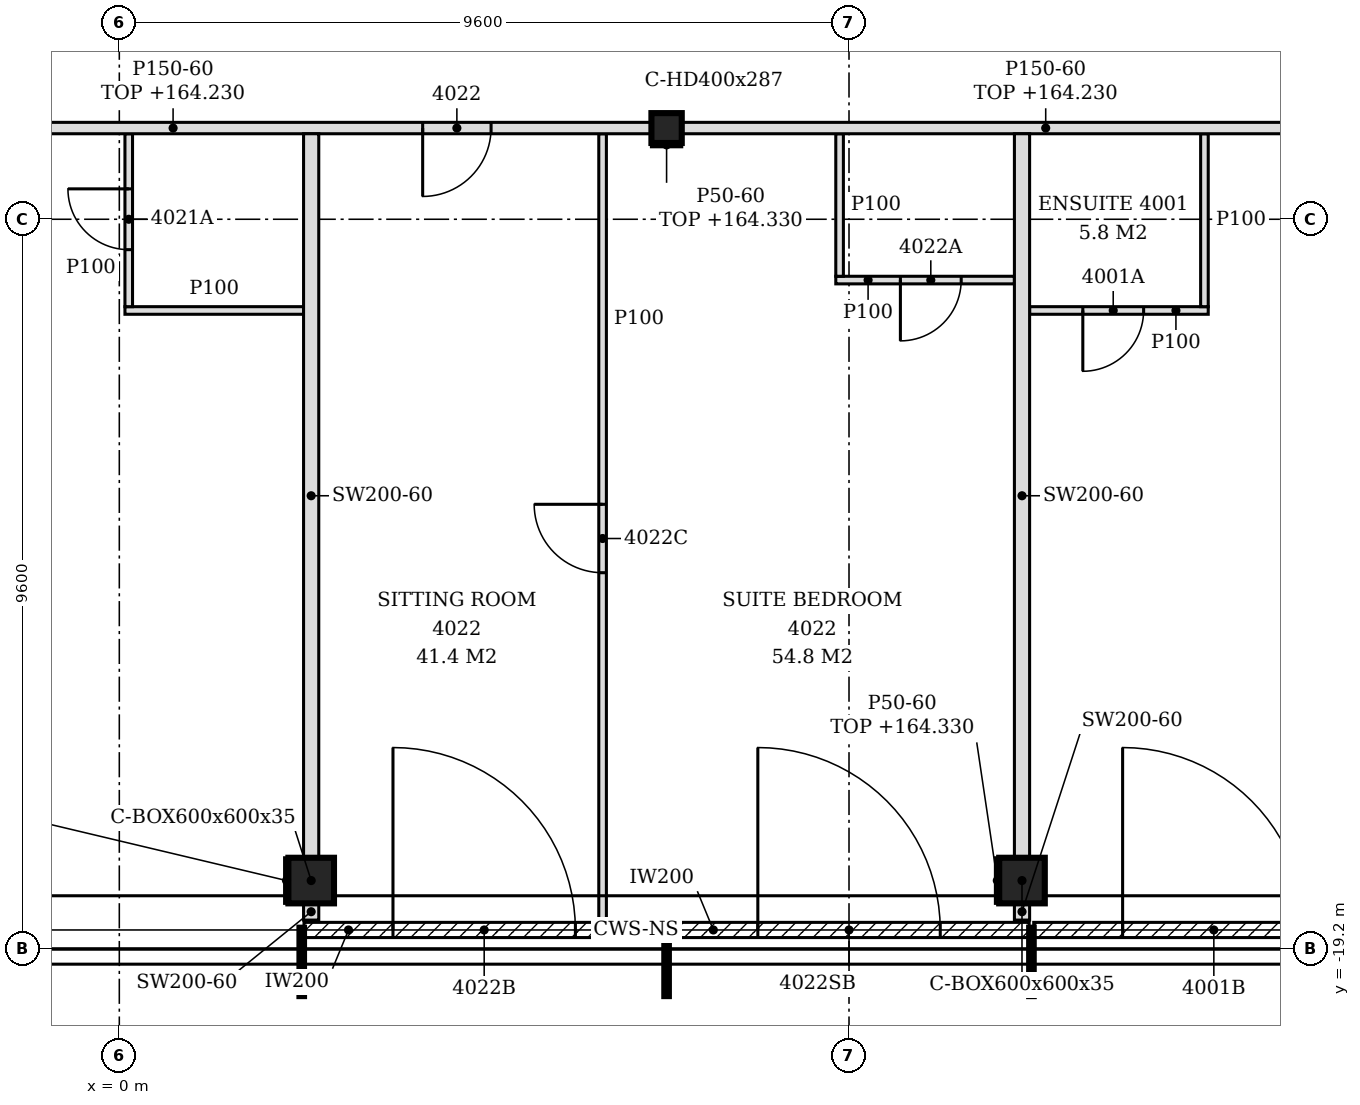
"""IFC4 building model, lengths in metres.
Left out: names, types, materials, properties, quantities, classifications, styles, units other than length and angle.
Written with IfcOpenShell. Run it as: python <this file> out.ifc"""

import sys

from ifc_helpers import new_model, si_unit, direction, frame, frame_2d, origin, origin_2d, place, context, subcontext, project, spatial, polyline, rectangle, hollow_rectangle, i_section, outline, extrude, element, fill, save


model = new_model("IFC4")
c1 = context("Model", 3, precision=1e-05, world=origin(), true_north=direction((0.0, 1.0)))
c2 = subcontext(c1, "Body", "Model", "MODEL_VIEW")
j1 = project(units=[si_unit("LENGTHUNIT", "METRE"), si_unit("PLANEANGLEUNIT", "RADIAN")], contexts=[c1])
p1 = place(None, origin())
s1 = spatial("IfcSite", under=j1, at=p1, CompositionType="ELEMENT")
p2 = place(p1, origin())
s2 = spatial("IfcBuilding", under=s1, at=p2, CompositionType="ELEMENT")
p3 = place(p2, frame((0.0, 0.0, 161.4)))
s3 = spatial("IfcBuildingStorey", under=s2, at=p3, CompositionType="ELEMENT", Elevation=161.4)
for number, where, z_axis, x_axis in (
    (1, (2.524, -18.3, -0.15), (0.0, 0.0, 1.0), (1.0, 0.0, 0.0)),
    (2, (11.876, -18.3, -0.15), (0.0, 0.0, 1.0), (1.0, 0.0, 0.0)),
):
    element("IfcColumn", number, at=place(p3, frame(where, z_axis=z_axis, x_axis=x_axis)), inside=s3, PredefinedType="COLUMN", context=c2, shape_type="SweptSolid", body=[
        extrude(hollow_rectangle(XDim=0.6, YDim=0.6, WallThickness=0.035, at=origin_2d()), origin(), (0.0, 0.0, 1.0), 3.6),
    ])
p4 = place(p3, frame((7.2, -8.4, -0.15), z_axis=(0.0, 0.0, 1.0), x_axis=(1.0, 0.0, 0.0)))
e3 = element("IfcColumn", 3, at=p4, inside=s3, PredefinedType="COLUMN", context=c2, shape_type="SweptSolid", body=[
    extrude(i_section(OverallWidth=0.399, OverallDepth=0.393, WebThickness=0.023, FlangeThickness=0.037, FilletRadius=0.015, at=origin_2d()), origin(), (0.0, 0.0, 1.0), 3.6),
])
p5 = place(p3, frame((2.43, -18.95, 0.0), z_axis=(0.0, 0.0, 1.0), x_axis=(1.0, 0.0, 0.0)))
e4 = element("IfcWall", 4, at=p5, inside=s3, PredefinedType="NOTDEFINED", context=c2, shape_type="SweptSolid", body=[
    extrude(rectangle(XDim=4.74, YDim=0.2, at=frame_2d((2.37, 0.0))), origin(), (0.0, 0.0, 1.0), 3.45),
])
p6 = place(p5, frame((1.17, 0.0, 0.0)))
e5 = element("IfcOpeningElement", 5, at=p6, cuts=e4, PredefinedType="OPENING", context=c2, shape_type="SweptSolid", body=[
    extrude(rectangle(XDim=2.4, YDim=2.4, at=frame_2d((1.2, 1.2))), frame((0.0, 0.11, 0.0), z_axis=(0.0, -1.0, 0.0), x_axis=(1.0, 0.0, 0.0)), (0.0, 0.0, 1.0), 0.22),
])
p7 = place(p3, frame((7.23, -18.95, 0.0), z_axis=(0.0, 0.0, 1.0), x_axis=(1.0, 0.0, 0.0)))
e6 = element("IfcWall", 6, at=p7, inside=s3, PredefinedType="NOTDEFINED", context=c2, shape_type="SweptSolid", body=[
    extrude(rectangle(XDim=4.74, YDim=0.2, at=frame_2d((2.37, 0.0))), origin(), (0.0, 0.0, 1.0), 3.45),
])
p8 = place(p7, frame((1.17, 0.0, 0.0)))
e7 = element("IfcOpeningElement", 7, at=p8, cuts=e6, PredefinedType="OPENING", context=c2, shape_type="SweptSolid", body=[
    extrude(rectangle(XDim=2.4, YDim=2.4, at=frame_2d((1.2, 1.2))), frame((0.0, 0.11, 0.0), z_axis=(0.0, -1.0, 0.0), x_axis=(1.0, 0.0, 0.0)), (0.0, 0.0, 1.0), 0.22),
])
p9 = place(p3, frame((12.03, -18.95, 0.0), z_axis=(0.0, 0.0, 1.0), x_axis=(1.0, 0.0, 0.0)))
e8 = element("IfcWall", 8, at=p9, inside=s3, PredefinedType="NOTDEFINED", context=c2, shape_type="SweptSolid", body=[
    extrude(rectangle(XDim=4.74, YDim=0.2, at=frame_2d((2.37, 0.0))), origin(), (0.0, 0.0, 1.0), 3.45),
])
p10 = place(p9, frame((1.17, 0.0, 0.0)))
e9 = element("IfcOpeningElement", 9, at=p10, cuts=e8, PredefinedType="OPENING", context=c2, shape_type="SweptSolid", body=[
    extrude(rectangle(XDim=2.4, YDim=2.4, at=frame_2d((1.2, 1.2))), frame((0.0, 0.11, 0.0), z_axis=(0.0, -1.0, 0.0), x_axis=(1.0, 0.0, 0.0)), (0.0, 0.0, 1.0), 0.22),
])
p11 = place(p3, frame((2.524, -18.82, 0.0), z_axis=(0.0, 0.0, 1.0), x_axis=(0.0, 1.0, 0.0)))
e10 = element("IfcWall", 10, at=p11, inside=s3, PredefinedType="PARTITIONING", context=c2, shape_type="SweptSolid", body=[
    extrude(rectangle(XDim=0.22, YDim=0.2, at=frame_2d((0.11, 0.0))), origin(), (0.0, 0.0, 1.0), 3.45),
])
p12 = place(p3, frame((6.358, -18.82, 0.0), z_axis=(0.0, 0.0, 1.0), x_axis=(0.0, 1.0, 0.0)))
e11 = element("IfcWall", 11, at=p12, inside=s3, PredefinedType="PARTITIONING", context=c2, shape_type="SweptSolid", body=[
    extrude(outline(polyline([(0.0, 0.0), (10.345, 0.0), (10.345, 2.83), (10.27, 2.83), (10.268, 3.45), (4.525, 3.45), (4.523, 2.88), (4.315, 2.88), (4.313, 3.45), (0.67, 3.45), (0.668, 2.93), (0.37, 2.93), (0.368, 3.45), (0.0, 3.45), (0.0, 0.0)])), frame((0.0, 0.05, 0.0), z_axis=(0.0, -1.0, 0.0), x_axis=(1.0, 0.0, 0.0)), (0.0, 0.0, 1.0), 0.1),
])
p13 = place(p12, frame((4.57, 0.0, 0.0)))
e12 = element("IfcOpeningElement", 12, at=p13, cuts=e11, PredefinedType="OPENING", context=c2, shape_type="SweptSolid", body=[
    extrude(rectangle(XDim=0.9, YDim=2.1, at=frame_2d((0.45, 1.05))), frame((0.0, 0.06, 0.0), z_axis=(0.0, -1.0, 0.0), x_axis=(1.0, 0.0, 0.0)), (0.0, 0.0, 1.0), 0.12),
])
p14 = place(p3, frame((11.876, -18.82, 0.0), z_axis=(0.0, 0.0, 1.0), x_axis=(0.0, 1.0, 0.0)))
e13 = element("IfcWall", 13, at=p14, inside=s3, PredefinedType="PARTITIONING", context=c2, shape_type="SweptSolid", body=[
    extrude(rectangle(XDim=0.22, YDim=0.2, at=frame_2d((0.11, 0.0))), origin(), (0.0, 0.0, 1.0), 3.45),
])
for number, where, z_axis, x_axis in (
    (14, (2.524, -18.0, 0.0), (0.0, 0.0, 1.0), (0.0, 1.0, 0.0)),
    (15, (11.876, -18.0, 0.0), (0.0, 0.0, 1.0), (0.0, 1.0, 0.0)),
):
    element("IfcWall", number, at=place(p3, frame(where, z_axis=z_axis, x_axis=x_axis)), inside=s3, PredefinedType="PARTITIONING", context=c2, shape_type="SweptSolid", body=[
        extrude(outline(polyline([(0.0, 0.0), (9.525, 0.0), (9.525, 2.83), (9.45, 2.83), (9.448, 3.45), (3.705, 3.45), (3.703, 2.88), (3.495, 2.88), (3.493, 3.45), (0.0, 3.45), (0.0, 0.0)])), frame((0.0, 0.1, 0.0), z_axis=(0.0, -1.0, 0.0), x_axis=(1.0, 0.0, 0.0)), (0.0, 0.0, 1.0), 0.2),
    ])
p15 = place(p3, frame((0.074, -10.8, 0.0), z_axis=(0.0, 0.0, 1.0), x_axis=(1.0, 0.0, 0.0)))
e16 = element("IfcWall", 16, at=p15, inside=s3, PredefinedType="PARTITIONING", context=c2, shape_type="SweptSolid", body=[
    extrude(rectangle(XDim=2.35, YDim=0.1, at=frame_2d((1.175, 0.0))), origin(), (0.0, 0.0, 1.0), 3.45),
])
p16 = place(p3, frame((0.124, -10.75, 0.0), z_axis=(0.0, 0.0, 1.0), x_axis=(0.0, 1.0, 0.0)))
e17 = element("IfcWall", 17, at=p16, inside=s3, PredefinedType="PARTITIONING", context=c2, shape_type="SweptSolid", body=[
    extrude(outline(polyline([(0.0, 0.0), (2.275, 0.0), (2.275, 2.83), (2.2, 2.83), (2.198, 3.45), (0.0, 3.45), (0.0, 0.0)])), frame((0.0, 0.05, 0.0), z_axis=(0.0, -1.0, 0.0), x_axis=(1.0, 0.0, 0.0)), (0.0, 0.0, 1.0), 0.1),
])
p17 = place(p16, frame((0.75, 0.0, 0.0)))
e18 = element("IfcOpeningElement", 18, at=p17, cuts=e17, PredefinedType="OPENING", context=c2, shape_type="SweptSolid", body=[
    extrude(rectangle(XDim=0.8, YDim=2.1, at=frame_2d((0.4, 1.05))), frame((0.0, 0.06, 0.0), z_axis=(0.0, -1.0, 0.0), x_axis=(1.0, 0.0, 0.0)), (0.0, 0.0, 1.0), 0.12),
])
p18 = place(p3, frame((11.976, -10.8, 0.0), z_axis=(0.0, 0.0, 1.0), x_axis=(1.0, 0.0, 0.0)))
e19 = element("IfcWall", 19, at=p18, inside=s3, PredefinedType="PARTITIONING", context=c2, shape_type="SweptSolid", body=[
    extrude(rectangle(XDim=2.35, YDim=0.1, at=frame_2d((1.175, 0.0))), origin(), (0.0, 0.0, 1.0), 3.45),
])
p19 = place(p18, frame((0.7, 0.0, 0.0)))
e20 = element("IfcOpeningElement", 20, at=p19, cuts=e19, PredefinedType="OPENING", context=c2, shape_type="SweptSolid", body=[
    extrude(rectangle(XDim=0.8, YDim=2.1, at=frame_2d((0.4, 1.05))), frame((0.0, 0.06, 0.0), z_axis=(0.0, -1.0, 0.0), x_axis=(1.0, 0.0, 0.0)), (0.0, 0.0, 1.0), 0.12),
])
p20 = place(p3, frame((14.276, -10.75, 0.0), z_axis=(0.0, 0.0, 1.0), x_axis=(0.0, 1.0, 0.0)))
e21 = element("IfcWall", 21, at=p20, inside=s3, PredefinedType="PARTITIONING", context=c2, shape_type="SweptSolid", body=[
    extrude(outline(polyline([(0.0, 0.0), (2.275, 0.0), (2.275, 2.83), (2.2, 2.83), (2.198, 3.45), (0.0, 3.45), (0.0, 0.0)])), frame((0.0, 0.05, 0.0), z_axis=(0.0, -1.0, 0.0), x_axis=(1.0, 0.0, 0.0)), (0.0, 0.0, 1.0), 0.1),
])
p21 = place(p3, frame((9.426, -10.4, 0.0), z_axis=(0.0, 0.0, 1.0), x_axis=(1.0, 0.0, 0.0)))
e22 = element("IfcWall", 22, at=p21, inside=s3, PredefinedType="PARTITIONING", context=c2, shape_type="SweptSolid", body=[
    extrude(rectangle(XDim=2.35, YDim=0.1, at=frame_2d((1.175, 0.0))), origin(), (0.0, 0.0, 1.0), 3.45),
])
p22 = place(p21, frame((0.85, 0.0, 0.0)))
e23 = element("IfcOpeningElement", 23, at=p22, cuts=e22, PredefinedType="OPENING", context=c2, shape_type="SweptSolid", body=[
    extrude(rectangle(XDim=0.8, YDim=2.1, at=frame_2d((0.4, 1.05))), frame((0.0, 0.06, 0.0), z_axis=(0.0, -1.0, 0.0), x_axis=(1.0, 0.0, 0.0)), (0.0, 0.0, 1.0), 0.12),
])
p23 = place(p3, frame((9.476, -10.35, 0.0), z_axis=(0.0, 0.0, 1.0), x_axis=(0.0, 1.0, 0.0)))
e24 = element("IfcWall", 24, at=p23, inside=s3, PredefinedType="PARTITIONING", context=c2, shape_type="SweptSolid", body=[
    extrude(outline(polyline([(0.0, 0.0), (1.875, 0.0), (1.875, 2.83), (1.8, 2.83), (1.798, 3.45), (0.0, 3.45), (0.0, 0.0)])), frame((0.0, 0.05, 0.0), z_axis=(0.0, -1.0, 0.0), x_axis=(1.0, 0.0, 0.0)), (0.0, 0.0, 1.0), 0.1),
])
p24 = place(p3, frame((-4.601, -8.4, 0.0), z_axis=(0.0, 0.0, 1.0), x_axis=(1.0, 0.0, 0.0)))
e25 = element("IfcWall", 25, at=p24, inside=s3, PredefinedType="PARTITIONING", context=c2, shape_type="SweptSolid", body=[
    extrude(rectangle(XDim=11.601, YDim=0.15, at=frame_2d((5.801, 0.0))), origin(), (0.0, 0.0, 1.0), 2.83),
])
p25 = place(p24, frame((1.125, 0.0, 0.0)))
e26 = element("IfcOpeningElement", 26, at=p25, cuts=e25, PredefinedType="OPENING", context=c2, shape_type="SweptSolid", body=[
    extrude(rectangle(XDim=0.9, YDim=2.1, at=frame_2d((0.45, 1.05))), frame((0.0, 0.085, 0.0), z_axis=(0.0, -1.0, 0.0), x_axis=(1.0, 0.0, 0.0)), (0.0, 0.0, 1.0), 0.17),
])
p26 = place(p24, frame((8.592, 0.0, 0.0)))
e27 = element("IfcOpeningElement", 27, at=p26, cuts=e25, PredefinedType="OPENING", context=c2, shape_type="SweptSolid", body=[
    extrude(rectangle(XDim=0.9, YDim=2.1, at=frame_2d((0.45, 1.05))), frame((0.0, 0.085, 0.0), z_axis=(0.0, -1.0, 0.0), x_axis=(1.0, 0.0, 0.0)), (0.0, 0.0, 1.0), 0.17),
])
p27 = place(p3, frame((7.399, -8.4, 0.0), z_axis=(0.0, 0.0, 1.0), x_axis=(1.0, 0.0, 0.0)))
e28 = element("IfcWall", 28, at=p27, inside=s3, PredefinedType="PARTITIONING", context=c2, shape_type="SweptSolid", body=[
    extrude(rectangle(XDim=11.601, YDim=0.15, at=frame_2d((5.801, 0.0))), origin(), (0.0, 0.0, 1.0), 2.83),
])
p28 = place(p27, frame((9.576, 0.0, 0.0)))
e29 = element("IfcOpeningElement", 29, at=p28, cuts=e28, PredefinedType="OPENING", context=c2, shape_type="SweptSolid", body=[
    extrude(rectangle(XDim=0.9, YDim=2.1, at=frame_2d((0.45, 1.05))), frame((0.0, 0.085, 0.0), z_axis=(0.0, -1.0, 0.0), x_axis=(1.0, 0.0, 0.0)), (0.0, 0.0, 1.0), 0.17),
])
for number, where, z_axis, x_axis in (
    (30, (2.199, -18.6, 0.0), (0.0, 0.0, 1.0), (0.0, 1.0, 0.0)),
    (31, (11.551, -18.6, 0.0), (0.0, 0.0, 1.0), (0.0, 1.0, 0.0)),
):
    element("IfcWall", number, at=place(p3, frame(where, z_axis=z_axis, x_axis=x_axis)), inside=s3, PredefinedType="PARTITIONING", context=c2, shape_type="SweptSolid", body=[
        extrude(rectangle(XDim=0.6, YDim=0.05, at=frame_2d((0.3, 0.0))), origin(), (0.0, 0.0, 1.0), 2.93),
    ])
p29 = place(p3, frame((7.0, -8.622, 0.0), z_axis=(0.0, 0.0, 1.0), x_axis=(1.0, 0.0, 0.0)))
e32 = element("IfcWall", 32, at=p29, inside=s3, PredefinedType="PARTITIONING", context=c2, shape_type="SweptSolid", body=[
    extrude(rectangle(XDim=0.399, YDim=0.05, at=frame_2d((0.199, 0.0))), origin(), (0.0, 0.0, 1.0), 2.93),
])
p30 = place(p6, origin())
e33 = element("IfcDoor", 33, at=p30, inside=s3, OperationType="SINGLE_SWING_LEFT", PredefinedType="DOOR", context=c2, shape_type="SweptSolid", body=[
    extrude(rectangle(XDim=2.4, YDim=2.4, at=frame_2d((1.2, 1.2))), frame((0.0, 0.025, 0.0), z_axis=(0.0, -1.0, 0.0), x_axis=(1.0, 0.0, 0.0)), (0.0, 0.0, 1.0), 0.05),
])
fill(e5, e33)
p31 = place(p8, origin())
e34 = element("IfcDoor", 34, at=p31, inside=s3, OperationType="SINGLE_SWING_LEFT", PredefinedType="DOOR", context=c2, shape_type="SweptSolid", body=[
    extrude(rectangle(XDim=2.4, YDim=2.4, at=frame_2d((1.2, 1.2))), frame((0.0, 0.025, 0.0), z_axis=(0.0, -1.0, 0.0), x_axis=(1.0, 0.0, 0.0)), (0.0, 0.0, 1.0), 0.05),
])
fill(e7, e34)
p32 = place(p10, origin())
e35 = element("IfcDoor", 35, at=p32, inside=s3, OperationType="SINGLE_SWING_LEFT", PredefinedType="DOOR", context=c2, shape_type="SweptSolid", body=[
    extrude(rectangle(XDim=2.4, YDim=2.4, at=frame_2d((1.2, 1.2))), frame((0.0, 0.025, 0.0), z_axis=(0.0, -1.0, 0.0), x_axis=(1.0, 0.0, 0.0)), (0.0, 0.0, 1.0), 0.05),
])
fill(e9, e35)
p33 = place(p19, frame((0.8, 0.0, 0.0), z_axis=(0.0, 0.0, 1.0), x_axis=(-1.0, 0.0, 0.0)))
e36 = element("IfcDoor", 36, at=p33, inside=s3, OperationType="SINGLE_SWING_RIGHT", PredefinedType="DOOR", context=c2, shape_type="SweptSolid", body=[
    extrude(rectangle(XDim=0.8, YDim=2.1, at=frame_2d((0.4, 1.05))), frame((0.0, 0.025, 0.0), z_axis=(0.0, -1.0, 0.0), x_axis=(1.0, 0.0, 0.0)), (0.0, 0.0, 1.0), 0.05),
])
fill(e20, e36)
p34 = place(p17, origin())
e37 = element("IfcDoor", 37, at=p34, inside=s3, OperationType="SINGLE_SWING_RIGHT", PredefinedType="DOOR", context=c2, shape_type="SweptSolid", body=[
    extrude(rectangle(XDim=0.8, YDim=2.1, at=frame_2d((0.4, 1.05))), frame((0.0, 0.025, 0.0), z_axis=(0.0, -1.0, 0.0), x_axis=(1.0, 0.0, 0.0)), (0.0, 0.0, 1.0), 0.05),
])
fill(e18, e37)
p35 = place(p26, frame((0.9, 0.0, 0.0), z_axis=(0.0, 0.0, 1.0), x_axis=(-1.0, 0.0, 0.0)))
e38 = element("IfcDoor", 38, at=p35, inside=s3, OperationType="SINGLE_SWING_RIGHT", PredefinedType="DOOR", context=c2, shape_type="SweptSolid", body=[
    extrude(rectangle(XDim=0.9, YDim=2.1, at=frame_2d((0.45, 1.05))), frame((0.0, 0.025, 0.0), z_axis=(0.0, -1.0, 0.0), x_axis=(1.0, 0.0, 0.0)), (0.0, 0.0, 1.0), 0.05),
])
fill(e27, e38)
p36 = place(p13, origin())
e39 = element("IfcDoor", 39, at=p36, inside=s3, OperationType="SINGLE_SWING_RIGHT", PredefinedType="DOOR", context=c2, shape_type="SweptSolid", body=[
    extrude(rectangle(XDim=0.9, YDim=2.1, at=frame_2d((0.45, 1.05))), frame((0.0, 0.025, 0.0), z_axis=(0.0, -1.0, 0.0), x_axis=(1.0, 0.0, 0.0)), (0.0, 0.0, 1.0), 0.05),
])
fill(e12, e39)
p37 = place(p22, frame((0.8, 0.0, 0.0), z_axis=(0.0, 0.0, 1.0), x_axis=(-1.0, 0.0, 0.0)))
e40 = element("IfcDoor", 40, at=p37, inside=s3, OperationType="SINGLE_SWING_RIGHT", PredefinedType="DOOR", context=c2, shape_type="SweptSolid", body=[
    extrude(rectangle(XDim=0.8, YDim=2.1, at=frame_2d((0.4, 1.05))), frame((0.0, 0.025, 0.0), z_axis=(0.0, -1.0, 0.0), x_axis=(1.0, 0.0, 0.0)), (0.0, 0.0, 1.0), 0.05),
])
fill(e23, e40)
save(model, sys.argv[1])
